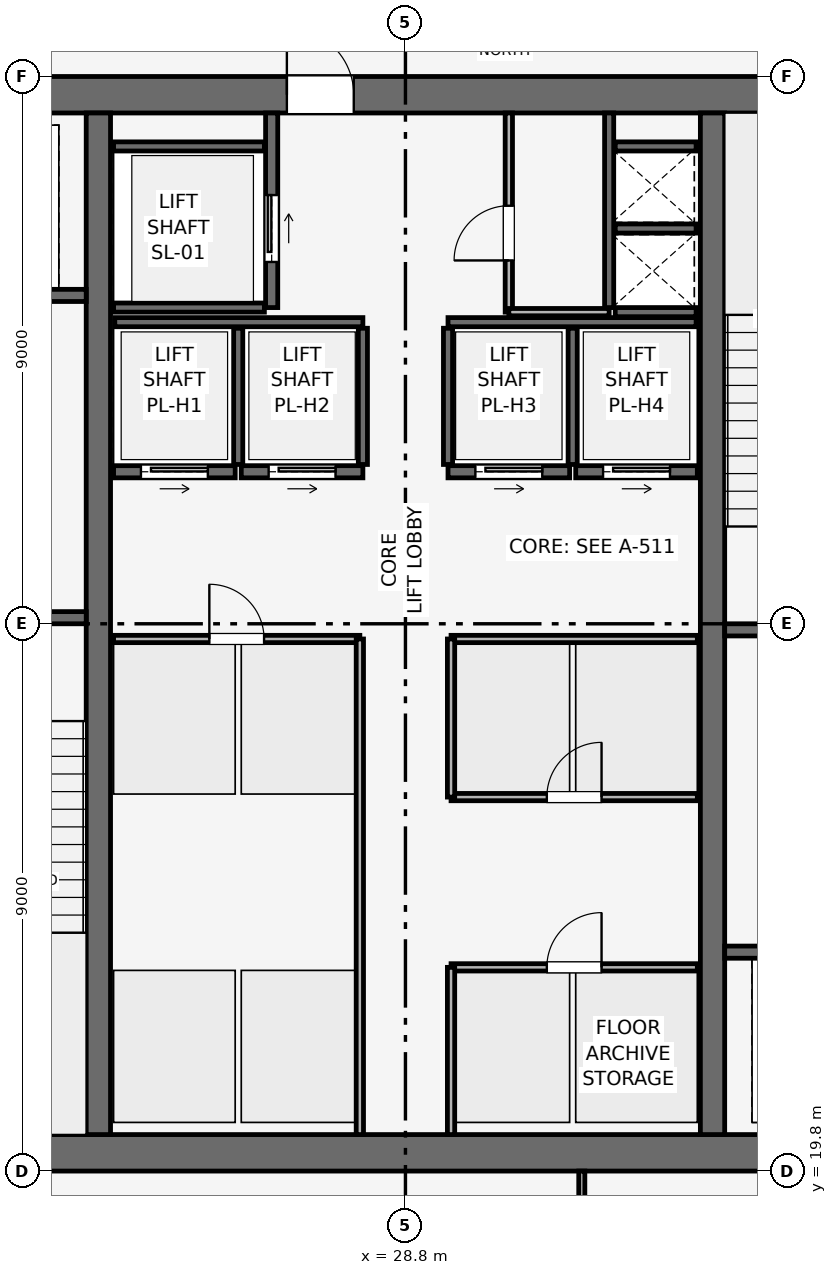
"""IFC4 building model, lengths in metres.
Left out: names, types, materials, properties, quantities, classifications, styles, units other than length and angle.
Written with IfcOpenShell. Run it as: python <this file> out.ifc"""

import sys

from ifc_helpers import new_model, si_unit, direction, frame, frame_2d, origin, place, context, subcontext, project, spatial, rectangle, extrude, element, fill, save


model = new_model("IFC4")
c1 = context("Model", 3, precision=1e-05, world=origin(), true_north=direction((0.0, 1.0)))
c2 = subcontext(c1, "Body", "Model", "MODEL_VIEW")
j1 = project(units=[si_unit("LENGTHUNIT", "METRE"), si_unit("PLANEANGLEUNIT", "RADIAN")], contexts=[c1])
p1 = place(None, origin())
s1 = spatial("IfcSite", under=j1, at=p1, CompositionType="ELEMENT")
p2 = place(p1, origin())
s2 = spatial("IfcBuilding", under=s1, at=p2, CompositionType="ELEMENT")
p3 = place(p2, frame((0.0, 0.0, 360.0)))
s3 = spatial("IfcBuildingStorey", under=s2, at=p3, CompositionType="ELEMENT", Elevation=360.0)
p4 = place(p3, frame((19.8, 20.1, 0.0), z_axis=(0.0, 0.0, 1.0), x_axis=(1.0, 0.0, 0.0)))
e1 = element("IfcWall", 1, at=p4, inside=s3, PredefinedType="SHEAR", context=c2, shape_type="SweptSolid", body=[
    extrude(rectangle(XDim=18.0, YDim=0.6, at=frame_2d((9.0, 0.0))), origin(), (0.0, 0.0, 1.0), 4.5),
])
p5 = place(p3, frame((19.8, 37.5, 0.0), z_axis=(0.0, 0.0, 1.0), x_axis=(1.0, 0.0, 0.0)))
e2 = element("IfcWall", 2, at=p5, inside=s3, PredefinedType="SHEAR", context=c2, shape_type="SweptSolid", body=[
    extrude(rectangle(XDim=18.0, YDim=0.6, at=frame_2d((9.0, 0.0))), origin(), (0.0, 0.0, 1.0), 4.5),
])
p6 = place(p5, frame((7.05, 0.0, 0.0)))
e3 = element("IfcOpeningElement", 3, at=p6, cuts=e2, PredefinedType="OPENING", context=c2, shape_type="SweptSolid", body=[
    extrude(rectangle(XDim=1.1, YDim=2.15, at=frame_2d((0.55, 1.075))), frame((0.0, 0.31, 0.0), z_axis=(0.0, -1.0, 0.0), x_axis=(1.0, 0.0, 0.0)), (0.0, 0.0, 1.0), 0.62),
])
for number, where, z_axis, x_axis in (
    (4, (23.75, 20.4, 0.0), (0.0, 0.0, 1.0), (0.0, 1.0, 0.0)),
    (5, (33.85, 20.4, 0.0), (0.0, 0.0, 1.0), (0.0, 1.0, 0.0)),
):
    element("IfcWall", number, at=place(p3, frame(where, z_axis=z_axis, x_axis=x_axis)), inside=s3, PredefinedType="SHEAR", context=c2, shape_type="SweptSolid", body=[
        extrude(rectangle(XDim=16.8, YDim=0.4, at=frame_2d((8.4, 0.0))), origin(), (0.0, 0.0, 1.0), 4.5),
    ])
p7 = place(p3, frame((20.4, 28.9, 0.0), z_axis=(0.0, 0.0, 1.0), x_axis=(1.0, 0.0, 0.0)))
e6 = element("IfcWall", 6, at=p7, inside=s3, PredefinedType="SHEAR", context=c2, shape_type="SweptSolid", body=[
    extrude(rectangle(XDim=3.15, YDim=0.2, at=frame_2d((1.575, 0.0))), origin(), (0.0, 0.0, 1.0), 4.24),
])
p8 = place(p7, frame((0.8, 0.0, 0.0)))
e7 = element("IfcOpeningElement", 7, at=p8, cuts=e6, PredefinedType="OPENING", context=c2, shape_type="SweptSolid", body=[
    extrude(rectangle(XDim=1.0, YDim=2.1, at=frame_2d((0.5, 1.05))), frame((0.0, 0.11, 0.0), z_axis=(0.0, -1.0, 0.0), x_axis=(1.0, 0.0, 0.0)), (0.0, 0.0, 1.0), 0.22),
])
p9 = place(p3, frame((34.05, 28.7, 0.0), z_axis=(0.0, 0.0, 1.0), x_axis=(1.0, 0.0, 0.0)))
e8 = element("IfcWall", 8, at=p9, inside=s3, PredefinedType="SHEAR", context=c2, shape_type="SweptSolid", body=[
    extrude(rectangle(XDim=3.15, YDim=0.2, at=frame_2d((1.575, 0.0))), origin(), (0.0, 0.0, 1.0), 4.24),
])
p10 = place(p9, frame((0.8, 0.0, 0.0)))
e9 = element("IfcOpeningElement", 9, at=p10, cuts=e8, PredefinedType="OPENING", context=c2, shape_type="SweptSolid", body=[
    extrude(rectangle(XDim=1.0, YDim=2.1, at=frame_2d((0.5, 1.05))), frame((0.0, 0.11, 0.0), z_axis=(0.0, -1.0, 0.0), x_axis=(1.0, 0.0, 0.0)), (0.0, 0.0, 1.0), 0.22),
])
p11 = place(p3, frame((32.15, 34.0, 0.0), z_axis=(0.0, 0.0, 1.0), x_axis=(0.0, 1.0, 0.0)))
e10 = element("IfcWall", 10, at=p11, inside=s3, PredefinedType="SHEAR", context=c2, shape_type="SweptSolid", body=[
    extrude(rectangle(XDim=3.2, YDim=0.15, at=frame_2d((1.6, 0.0))), origin(), (0.0, 0.0, 1.0), 4.24),
])
for number, where, z_axis, x_axis in (
    (11, (32.25, 33.925, 0.0), (0.0, 0.0, 1.0), (1.0, 0.0, 0.0)),
    (12, (32.25, 35.3, 0.0), (0.0, 0.0, 1.0), (1.0, 0.0, 0.0)),
):
    element("IfcWall", number, at=place(p3, frame(where, z_axis=z_axis, x_axis=x_axis)), inside=s3, PredefinedType="SHEAR", context=c2, shape_type="SweptSolid", body=[
        extrude(rectangle(XDim=1.33, YDim=0.15, at=frame_2d((0.665, 0.0))), origin(), (0.0, 0.0, 1.0), 4.24),
    ])
p12 = place(p3, frame((20.5, 34.2, 0.0), z_axis=(0.0, 0.0, 1.0), x_axis=(1.0, 0.0, 0.0)))
e13 = element("IfcWall", 13, at=p12, inside=s3, PredefinedType="SHEAR", context=c2, shape_type="SweptSolid", body=[
    extrude(rectangle(XDim=3.05, YDim=0.2, at=frame_2d((1.525, 0.0))), origin(), (0.0, 0.0, 1.0), 4.24),
])
p13 = place(p12, frame((0.75, 0.0, 0.0)))
e14 = element("IfcOpeningElement", 14, at=p13, cuts=e13, PredefinedType="OPENING", context=c2, shape_type="SweptSolid", body=[
    extrude(rectangle(XDim=1.1, YDim=2.15, at=frame_2d((0.55, 1.075))), frame((0.0, 0.11, 0.0), z_axis=(0.0, -1.0, 0.0), x_axis=(1.0, 0.0, 0.0)), (0.0, 0.0, 1.0), 0.22),
])
p14 = place(p3, frame((34.05, 23.4, 0.0), z_axis=(0.0, 0.0, 1.0), x_axis=(1.0, 0.0, 0.0)))
e15 = element("IfcWall", 15, at=p14, inside=s3, PredefinedType="SHEAR", context=c2, shape_type="SweptSolid", body=[
    extrude(rectangle(XDim=3.05, YDim=0.2, at=frame_2d((1.525, 0.0))), origin(), (0.0, 0.0, 1.0), 4.24),
])
p15 = place(p14, frame((1.2, 0.0, 0.0)))
e16 = element("IfcOpeningElement", 16, at=p15, cuts=e15, PredefinedType="OPENING", context=c2, shape_type="SweptSolid", body=[
    extrude(rectangle(XDim=1.1, YDim=2.15, at=frame_2d((0.55, 1.075))), frame((0.0, 0.11, 0.0), z_axis=(0.0, -1.0, 0.0), x_axis=(1.0, 0.0, 0.0)), (0.0, 0.0, 1.0), 0.22),
])
p16 = place(p3, frame((26.6, 34.0, 0.0), z_axis=(0.0, 0.0, 1.0), x_axis=(0.0, 1.0, 0.0)))
e17 = element("IfcWall", 17, at=p16, inside=s3, PredefinedType="SHEAR", context=c2, shape_type="SweptSolid", body=[
    extrude(rectangle(XDim=3.2, YDim=0.2, at=frame_2d((1.6, 0.0))), origin(), (0.0, 0.0, 1.0), 4.24),
])
p17 = place(p16, frame((0.75, 0.0, 0.0)))
e18 = element("IfcOpeningElement", 18, at=p17, cuts=e17, PredefinedType="OPENING", context=c2, shape_type="SweptSolid", body=[
    extrude(rectangle(XDim=1.1, YDim=2.15, at=frame_2d((0.55, 1.075))), frame((0.0, 0.11, 0.0), z_axis=(0.0, -1.0, 0.0), x_axis=(1.0, 0.0, 0.0)), (0.0, 0.0, 1.0), 0.22),
])
for number, where, z_axis, x_axis in (
    (19, (24.0, 34.0, 0.0), (0.0, 0.0, 1.0), (1.0, 0.0, 0.0)),
    (20, (24.0, 36.65, 0.0), (0.0, 0.0, 1.0), (1.0, 0.0, 0.0)),
):
    element("IfcWall", number, at=place(p3, frame(where, z_axis=z_axis, x_axis=x_axis)), inside=s3, PredefinedType="SHEAR", context=c2, shape_type="SweptSolid", body=[
        extrude(rectangle(XDim=2.48, YDim=0.15, at=frame_2d((1.24, 0.0))), origin(), (0.0, 0.0, 1.0), 4.24),
    ])
p18 = place(p3, frame((24.0, 31.3, 0.0), z_axis=(0.0, 0.0, 1.0), x_axis=(1.0, 0.0, 0.0)))
e21 = element("IfcWall", 21, at=p18, inside=s3, PredefinedType="SHEAR", context=c2, shape_type="SweptSolid", body=[
    extrude(rectangle(XDim=2.0, YDim=0.2, at=frame_2d((1.0, 0.0))), origin(), (0.0, 0.0, 1.0), 4.24),
])
p19 = place(p18, frame((0.45, 0.0, 0.0)))
e22 = element("IfcOpeningElement", 22, at=p19, cuts=e21, PredefinedType="OPENING", context=c2, shape_type="SweptSolid", body=[
    extrude(rectangle(XDim=1.1, YDim=2.15, at=frame_2d((0.55, 1.075))), frame((0.0, 0.11, 0.0), z_axis=(0.0, -1.0, 0.0), x_axis=(1.0, 0.0, 0.0)), (0.0, 0.0, 1.0), 0.22),
])
p20 = place(p3, frame((26.1, 31.3, 0.0), z_axis=(0.0, 0.0, 1.0), x_axis=(1.0, 0.0, 0.0)))
e23 = element("IfcWall", 23, at=p20, inside=s3, PredefinedType="SHEAR", context=c2, shape_type="SweptSolid", body=[
    extrude(rectangle(XDim=2.0, YDim=0.2, at=frame_2d((1.0, 0.0))), origin(), (0.0, 0.0, 1.0), 4.24),
])
p21 = place(p20, frame((0.45, 0.0, 0.0)))
e24 = element("IfcOpeningElement", 24, at=p21, cuts=e23, PredefinedType="OPENING", context=c2, shape_type="SweptSolid", body=[
    extrude(rectangle(XDim=1.1, YDim=2.15, at=frame_2d((0.55, 1.075))), frame((0.0, 0.11, 0.0), z_axis=(0.0, -1.0, 0.0), x_axis=(1.0, 0.0, 0.0)), (0.0, 0.0, 1.0), 0.22),
])
p22 = place(p3, frame((29.5, 31.3, 0.0), z_axis=(0.0, 0.0, 1.0), x_axis=(1.0, 0.0, 0.0)))
e25 = element("IfcWall", 25, at=p22, inside=s3, PredefinedType="SHEAR", context=c2, shape_type="SweptSolid", body=[
    extrude(rectangle(XDim=2.0, YDim=0.2, at=frame_2d((1.0, 0.0))), origin(), (0.0, 0.0, 1.0), 4.24),
])
p23 = place(p22, frame((0.45, 0.0, 0.0)))
e26 = element("IfcOpeningElement", 26, at=p23, cuts=e25, PredefinedType="OPENING", context=c2, shape_type="SweptSolid", body=[
    extrude(rectangle(XDim=1.1, YDim=2.15, at=frame_2d((0.55, 1.075))), frame((0.0, 0.11, 0.0), z_axis=(0.0, -1.0, 0.0), x_axis=(1.0, 0.0, 0.0)), (0.0, 0.0, 1.0), 0.22),
])
p24 = place(p3, frame((31.6, 31.3, 0.0), z_axis=(0.0, 0.0, 1.0), x_axis=(1.0, 0.0, 0.0)))
e27 = element("IfcWall", 27, at=p24, inside=s3, PredefinedType="SHEAR", context=c2, shape_type="SweptSolid", body=[
    extrude(rectangle(XDim=2.0, YDim=0.2, at=frame_2d((1.0, 0.0))), origin(), (0.0, 0.0, 1.0), 4.24),
])
p25 = place(p24, frame((0.45, 0.0, 0.0)))
e28 = element("IfcOpeningElement", 28, at=p25, cuts=e27, PredefinedType="OPENING", context=c2, shape_type="SweptSolid", body=[
    extrude(rectangle(XDim=1.1, YDim=2.15, at=frame_2d((0.55, 1.075))), frame((0.0, 0.11, 0.0), z_axis=(0.0, -1.0, 0.0), x_axis=(1.0, 0.0, 0.0)), (0.0, 0.0, 1.0), 0.22),
])
p26 = place(p3, frame((32.25, 36.65, 0.0), z_axis=(0.0, 0.0, 1.0), x_axis=(1.0, 0.0, 0.0)))
e29 = element("IfcWall", 29, at=p26, inside=s3, PredefinedType="SHEAR", context=c2, shape_type="SweptSolid", body=[
    extrude(rectangle(XDim=1.33, YDim=0.15, at=frame_2d((0.665, 0.0))), origin(), (0.0, 0.0, 1.0), 4.24),
])
for number, where, z_axis, x_axis in (
    (30, (24.02, 33.76, 0.0), (0.0, 0.0, 1.0), (1.0, 0.0, 0.0)),
    (31, (29.5, 33.76, 0.0), (0.0, 0.0, 1.0), (1.0, 0.0, 0.0)),
):
    element("IfcWall", number, at=place(p3, frame(where, z_axis=z_axis, x_axis=x_axis)), inside=s3, PredefinedType="SHEAR", context=c2, shape_type="SweptSolid", body=[
        extrude(rectangle(XDim=4.08, YDim=0.15, at=frame_2d((2.04, 0.0))), origin(), (0.0, 0.0, 1.0), 4.24),
    ])
for number, where, z_axis, x_axis in (
    (32, (26.05, 31.42, 0.0), (0.0, 0.0, 1.0), (0.0, 1.0, 0.0)),
    (33, (28.1, 31.42, 0.0), (0.0, 0.0, 1.0), (0.0, 1.0, 0.0)),
    (34, (29.5, 31.42, 0.0), (0.0, 0.0, 1.0), (0.0, 1.0, 0.0)),
    (35, (31.55, 31.42, 0.0), (0.0, 0.0, 1.0), (0.0, 1.0, 0.0)),
):
    element("IfcWall", number, at=place(p3, frame(where, z_axis=z_axis, x_axis=x_axis)), inside=s3, PredefinedType="SHEAR", context=c2, shape_type="SweptSolid", body=[
        extrude(rectangle(XDim=2.24, YDim=0.15, at=frame_2d((1.12, 0.0))), origin(), (0.0, 0.0, 1.0), 4.24),
    ])
p27 = place(p3, frame((30.5, 33.925, 0.0), z_axis=(0.0, 0.0, 1.0), x_axis=(0.0, 1.0, 0.0)))
e36 = element("IfcWall", 36, at=p27, inside=s3, PredefinedType="PARTITIONING", context=c2, shape_type="SweptSolid", body=[
    extrude(rectangle(XDim=3.275, YDim=0.12, at=frame_2d((1.637, 0.0))), origin(), (0.0, 0.0, 1.0), 4.24),
])
p28 = place(p27, frame((0.85, 0.0, 0.0)))
e37 = element("IfcOpeningElement", 37, at=p28, cuts=e36, PredefinedType="OPENING", context=c2, shape_type="SweptSolid", body=[
    extrude(rectangle(XDim=0.9, YDim=2.1, at=frame_2d((0.45, 1.05))), frame((0.0, 0.07, 0.0), z_axis=(0.0, -1.0, 0.0), x_axis=(1.0, 0.0, 0.0)), (0.0, 0.0, 1.0), 0.14),
])
p29 = place(p3, frame((30.5, 33.925, 0.0), z_axis=(0.0, 0.0, 1.0), x_axis=(1.0, 0.0, 0.0)))
e38 = element("IfcWall", 38, at=p29, inside=s3, PredefinedType="PARTITIONING", context=c2, shape_type="SweptSolid", body=[
    extrude(rectangle(XDim=1.65, YDim=0.12, at=frame_2d((0.825, 0.0))), origin(), (0.0, 0.0, 1.0), 4.24),
])
p30 = place(p3, frame((24.0, 28.55, 0.0), z_axis=(0.0, 0.0, 1.0), x_axis=(1.0, 0.0, 0.0)))
e39 = element("IfcWall", 39, at=p30, inside=s3, PredefinedType="PARTITIONING", context=c2, shape_type="SweptSolid", body=[
    extrude(rectangle(XDim=4.05, YDim=0.12, at=frame_2d((2.025, 0.0))), origin(), (0.0, 0.0, 1.0), 4.24),
])
p31 = place(p30, frame((1.575, 0.0, 0.0)))
e40 = element("IfcOpeningElement", 40, at=p31, cuts=e39, PredefinedType="OPENING", context=c2, shape_type="SweptSolid", body=[
    extrude(rectangle(XDim=0.9, YDim=2.1, at=frame_2d((0.45, 1.05))), frame((0.0, 0.07, 0.0), z_axis=(0.0, -1.0, 0.0), x_axis=(1.0, 0.0, 0.0)), (0.0, 0.0, 1.0), 0.14),
])
p32 = place(p3, frame((28.05, 20.4, 0.0), z_axis=(0.0, 0.0, 1.0), x_axis=(0.0, 1.0, 0.0)))
e41 = element("IfcWall", 41, at=p32, inside=s3, PredefinedType="PARTITIONING", context=c2, shape_type="SweptSolid", body=[
    extrude(rectangle(XDim=8.15, YDim=0.12, at=frame_2d((4.075, 0.0))), origin(), (0.0, 0.0, 1.0), 4.24),
])
p33 = place(p3, frame((29.55, 23.15, 0.0), z_axis=(0.0, 0.0, 1.0), x_axis=(1.0, 0.0, 0.0)))
e42 = element("IfcWall", 42, at=p33, inside=s3, PredefinedType="PARTITIONING", context=c2, shape_type="SweptSolid", body=[
    extrude(rectangle(XDim=4.05, YDim=0.12, at=frame_2d((2.025, 0.0))), origin(), (0.0, 0.0, 1.0), 4.24),
])
p34 = place(p33, frame((1.575, 0.0, 0.0)))
e43 = element("IfcOpeningElement", 43, at=p34, cuts=e42, PredefinedType="OPENING", context=c2, shape_type="SweptSolid", body=[
    extrude(rectangle(XDim=0.9, YDim=2.1, at=frame_2d((0.45, 1.05))), frame((0.0, 0.07, 0.0), z_axis=(0.0, -1.0, 0.0), x_axis=(1.0, 0.0, 0.0)), (0.0, 0.0, 1.0), 0.14),
])
p35 = place(p3, frame((29.55, 20.4, 0.0), z_axis=(0.0, 0.0, 1.0), x_axis=(0.0, 1.0, 0.0)))
e44 = element("IfcWall", 44, at=p35, inside=s3, PredefinedType="PARTITIONING", context=c2, shape_type="SweptSolid", body=[
    extrude(rectangle(XDim=2.75, YDim=0.12, at=frame_2d((1.375, 0.0))), origin(), (0.0, 0.0, 1.0), 4.24),
])
p36 = place(p3, frame((29.55, 25.95, 0.0), z_axis=(0.0, 0.0, 1.0), x_axis=(1.0, 0.0, 0.0)))
e45 = element("IfcWall", 45, at=p36, inside=s3, PredefinedType="PARTITIONING", context=c2, shape_type="SweptSolid", body=[
    extrude(rectangle(XDim=4.05, YDim=0.12, at=frame_2d((2.025, 0.0))), origin(), (0.0, 0.0, 1.0), 4.24),
])
p37 = place(p36, frame((1.575, 0.0, 0.0)))
e46 = element("IfcOpeningElement", 46, at=p37, cuts=e45, PredefinedType="OPENING", context=c2, shape_type="SweptSolid", body=[
    extrude(rectangle(XDim=0.9, YDim=2.1, at=frame_2d((0.45, 1.05))), frame((0.0, 0.07, 0.0), z_axis=(0.0, -1.0, 0.0), x_axis=(1.0, 0.0, 0.0)), (0.0, 0.0, 1.0), 0.14),
])
p38 = place(p3, frame((29.55, 28.55, 0.0), z_axis=(0.0, 0.0, 1.0), x_axis=(1.0, 0.0, 0.0)))
e47 = element("IfcWall", 47, at=p38, inside=s3, PredefinedType="PARTITIONING", context=c2, shape_type="SweptSolid", body=[
    extrude(rectangle(XDim=4.05, YDim=0.12, at=frame_2d((2.025, 0.0))), origin(), (0.0, 0.0, 1.0), 4.24),
])
p39 = place(p3, frame((29.55, 25.95, 0.0), z_axis=(0.0, 0.0, 1.0), x_axis=(0.0, 1.0, 0.0)))
e48 = element("IfcWall", 48, at=p39, inside=s3, PredefinedType="PARTITIONING", context=c2, shape_type="SweptSolid", body=[
    extrude(rectangle(XDim=2.6, YDim=0.12, at=frame_2d((1.3, 0.0))), origin(), (0.0, 0.0, 1.0), 4.24),
])
p40 = place(p3, frame((31.7, 8.53, 0.0), z_axis=(0.0, 0.0, 1.0), x_axis=(0.0, 1.0, 0.0)))
e49 = element("IfcWall", 49, at=p40, inside=s3, PredefinedType="MOVABLE", context=c2, shape_type="SweptSolid", body=[
    extrude(rectangle(XDim=11.27, YDim=0.1, at=frame_2d((5.635, 0.0))), origin(), (0.0, 0.0, 1.0), 3.865),
])
p41 = place(p40, frame((8.87, 0.0, 0.0)))
e50 = element("IfcOpeningElement", 50, at=p41, cuts=e49, PredefinedType="OPENING", context=c2, shape_type="SweptSolid", body=[
    extrude(rectangle(XDim=0.9, YDim=2.1, at=frame_2d((0.45, 1.05))), frame((0.0, 0.06, 0.0), z_axis=(0.0, -1.0, 0.0), x_axis=(1.0, 0.0, 0.0)), (0.0, 0.0, 1.0), 0.12),
])
p42 = place(p17, origin())
e51 = element("IfcDoor", 51, at=p42, inside=s3, OperationType="SLIDING_TO_RIGHT", PredefinedType="DOOR", context=c2, shape_type="SweptSolid", body=[
    extrude(rectangle(XDim=1.1, YDim=2.15, at=frame_2d((0.55, 1.075))), frame((0.0, 0.025, 0.0), z_axis=(0.0, -1.0, 0.0), x_axis=(1.0, 0.0, 0.0)), (0.0, 0.0, 1.0), 0.05),
])
fill(e18, e51)
p43 = place(p19, origin())
e52 = element("IfcDoor", 52, at=p43, inside=s3, OperationType="SLIDING_TO_RIGHT", PredefinedType="DOOR", context=c2, shape_type="SweptSolid", body=[
    extrude(rectangle(XDim=1.1, YDim=2.15, at=frame_2d((0.55, 1.075))), frame((0.0, 0.025, 0.0), z_axis=(0.0, -1.0, 0.0), x_axis=(1.0, 0.0, 0.0)), (0.0, 0.0, 1.0), 0.05),
])
fill(e22, e52)
p44 = place(p21, origin())
e53 = element("IfcDoor", 53, at=p44, inside=s3, OperationType="SLIDING_TO_RIGHT", PredefinedType="DOOR", context=c2, shape_type="SweptSolid", body=[
    extrude(rectangle(XDim=1.1, YDim=2.15, at=frame_2d((0.55, 1.075))), frame((0.0, 0.025, 0.0), z_axis=(0.0, -1.0, 0.0), x_axis=(1.0, 0.0, 0.0)), (0.0, 0.0, 1.0), 0.05),
])
fill(e24, e53)
p45 = place(p23, origin())
e54 = element("IfcDoor", 54, at=p45, inside=s3, OperationType="SLIDING_TO_RIGHT", PredefinedType="DOOR", context=c2, shape_type="SweptSolid", body=[
    extrude(rectangle(XDim=1.1, YDim=2.15, at=frame_2d((0.55, 1.075))), frame((0.0, 0.025, 0.0), z_axis=(0.0, -1.0, 0.0), x_axis=(1.0, 0.0, 0.0)), (0.0, 0.0, 1.0), 0.05),
])
fill(e26, e54)
p46 = place(p25, origin())
e55 = element("IfcDoor", 55, at=p46, inside=s3, OperationType="SLIDING_TO_RIGHT", PredefinedType="DOOR", context=c2, shape_type="SweptSolid", body=[
    extrude(rectangle(XDim=1.1, YDim=2.15, at=frame_2d((0.55, 1.075))), frame((0.0, 0.025, 0.0), z_axis=(0.0, -1.0, 0.0), x_axis=(1.0, 0.0, 0.0)), (0.0, 0.0, 1.0), 0.05),
])
fill(e28, e55)
p47 = place(p28, origin())
e56 = element("IfcDoor", 56, at=p47, inside=s3, OperationType="SINGLE_SWING_LEFT", PredefinedType="DOOR", context=c2, shape_type="SweptSolid", body=[
    extrude(rectangle(XDim=0.9, YDim=2.1, at=frame_2d((0.45, 1.05))), frame((0.0, 0.025, 0.0), z_axis=(0.0, -1.0, 0.0), x_axis=(1.0, 0.0, 0.0)), (0.0, 0.0, 1.0), 0.05),
])
fill(e37, e56)
p48 = place(p31, origin())
e57 = element("IfcDoor", 57, at=p48, inside=s3, OperationType="SINGLE_SWING_LEFT", PredefinedType="DOOR", context=c2, shape_type="SweptSolid", body=[
    extrude(rectangle(XDim=0.9, YDim=2.1, at=frame_2d((0.45, 1.05))), frame((0.0, 0.025, 0.0), z_axis=(0.0, -1.0, 0.0), x_axis=(1.0, 0.0, 0.0)), (0.0, 0.0, 1.0), 0.05),
])
fill(e40, e57)
p49 = place(p34, origin())
e58 = element("IfcDoor", 58, at=p49, inside=s3, OperationType="SINGLE_SWING_RIGHT", PredefinedType="DOOR", context=c2, shape_type="SweptSolid", body=[
    extrude(rectangle(XDim=0.9, YDim=2.1, at=frame_2d((0.45, 1.05))), frame((0.0, 0.025, 0.0), z_axis=(0.0, -1.0, 0.0), x_axis=(1.0, 0.0, 0.0)), (0.0, 0.0, 1.0), 0.05),
])
fill(e43, e58)
p50 = place(p37, origin())
e59 = element("IfcDoor", 59, at=p50, inside=s3, OperationType="SINGLE_SWING_RIGHT", PredefinedType="DOOR", context=c2, shape_type="SweptSolid", body=[
    extrude(rectangle(XDim=0.9, YDim=2.1, at=frame_2d((0.45, 1.05))), frame((0.0, 0.025, 0.0), z_axis=(0.0, -1.0, 0.0), x_axis=(1.0, 0.0, 0.0)), (0.0, 0.0, 1.0), 0.05),
])
fill(e46, e59)
p51 = place(p6, origin())
e60 = element("IfcDoor", 60, at=p51, inside=s3, OperationType="SINGLE_SWING_LEFT", PredefinedType="DOOR", context=c2, shape_type="SweptSolid", body=[
    extrude(rectangle(XDim=1.1, YDim=2.15, at=frame_2d((0.55, 1.075))), frame((0.0, 0.025, 0.0), z_axis=(0.0, -1.0, 0.0), x_axis=(1.0, 0.0, 0.0)), (0.0, 0.0, 1.0), 0.05),
])
fill(e3, e60)
save(model, sys.argv[1])
